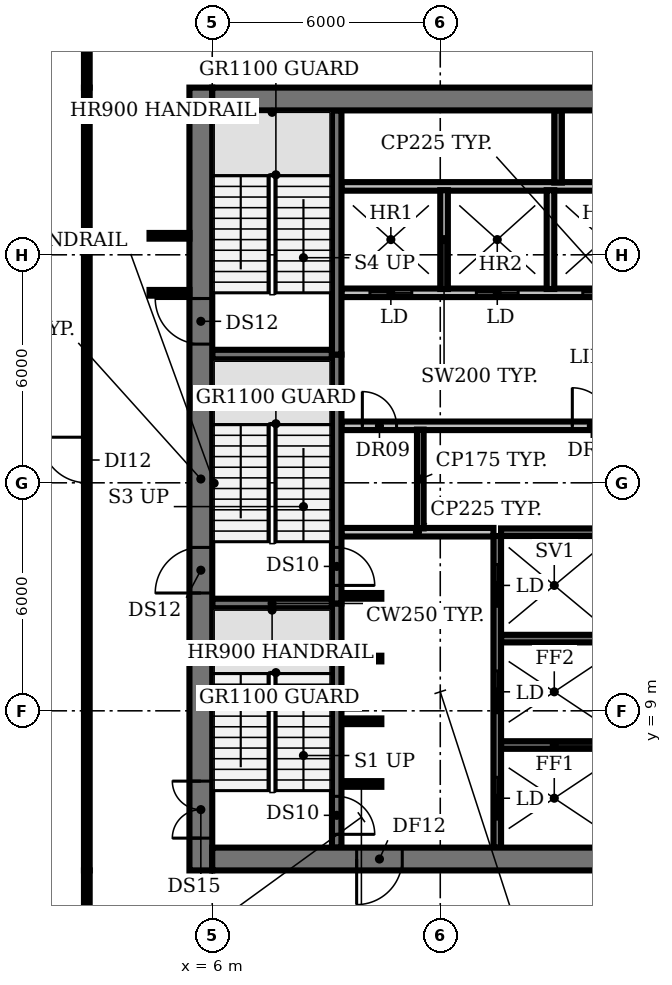
"""IFC4 building model, lengths in metres.
Left out: names, types, materials, properties, quantities, classifications, styles, units other than length and angle.
Written with IfcOpenShell. Run it as: python <this file> out.ifc"""

import sys

from ifc_helpers import new_model, si_unit, direction, frame, frame_2d, origin, place, context, subcontext, project, spatial, rectangle, extrude, element, fill, save


model = new_model("IFC4")
c1 = context("Model", 3, precision=1e-05, world=origin(), true_north=direction((0.0, 1.0)))
c2 = subcontext(c1, "Body", "Model", "MODEL_VIEW")
j1 = project(units=[si_unit("LENGTHUNIT", "METRE"), si_unit("PLANEANGLEUNIT", "RADIAN")], contexts=[c1])
p1 = place(None, origin())
s1 = spatial("IfcSite", under=j1, at=p1, CompositionType="ELEMENT")
p2 = place(p1, origin())
s2 = spatial("IfcBuilding", under=s1, at=p2, CompositionType="ELEMENT")
p3 = place(p2, frame((0.0, 0.0, 176.0)))
s3 = spatial("IfcBuildingStorey", under=s2, at=p3, CompositionType="ELEMENT", Elevation=176.0)
p4 = place(p3, frame((9.4, 7.075, 0.0), z_axis=(0.0, 0.0, 1.0), x_axis=(1.0, 0.0, 0.0)))
e1 = element("IfcWall", 1, at=p4, inside=s3, PredefinedType="SHEAR", context=c2, shape_type="SweptSolid", body=[
    extrude(rectangle(XDim=1.05, YDim=0.15, at=frame_2d((0.525, 0.0))), origin(), (0.0, 0.0, 1.0), 3.85),
])
p5 = place(p3, frame((13.6, 8.1, 0.0), z_axis=(0.0, 0.0, 1.0), x_axis=(1.0, 0.0, 0.0)))
e2 = element("IfcWall", 2, at=p5, inside=s3, PredefinedType="SHEAR", context=c2, shape_type="SweptSolid", body=[
    extrude(rectangle(XDim=2.8, YDim=0.2, at=frame_2d((1.4, 0.0))), origin(), (0.0, 0.0, 1.0), 3.85),
])
for number, where, z_axis, x_axis in (
    (3, (9.4, 8.725, 0.0), (0.0, 0.0, 1.0), (1.0, 0.0, 0.0)),
    (4, (9.4, 10.375, 0.0), (0.0, 0.0, 1.0), (1.0, 0.0, 0.0)),
):
    element("IfcWall", number, at=place(p3, frame(where, z_axis=z_axis, x_axis=x_axis)), inside=s3, PredefinedType="SHEAR", context=c2, shape_type="SweptSolid", body=[
        extrude(rectangle(XDim=1.05, YDim=0.15, at=frame_2d((0.525, 0.0))), origin(), (0.0, 0.0, 1.0), 3.85),
    ])
p6 = place(p3, frame((13.6, 10.9, 0.0), z_axis=(0.0, 0.0, 1.0), x_axis=(1.0, 0.0, 0.0)))
e5 = element("IfcWall", 5, at=p6, inside=s3, PredefinedType="SHEAR", context=c2, shape_type="SweptSolid", body=[
    extrude(rectangle(XDim=2.8, YDim=0.2, at=frame_2d((1.4, 0.0))), origin(), (0.0, 0.0, 1.0), 3.85),
])
p7 = place(p3, frame((6.0, 11.825, 0.0), z_axis=(0.0, 0.0, 1.0), x_axis=(1.0, 0.0, 0.0)))
e6 = element("IfcWall", 6, at=p7, inside=s3, PredefinedType="SHEAR", context=c2, shape_type="SweptSolid", body=[
    extrude(rectangle(XDim=3.15, YDim=0.25, at=frame_2d((1.575, 0.0))), origin(), (0.0, 0.0, 1.0), 3.85),
])
p8 = place(p3, frame((9.4, 12.025, 0.0), z_axis=(0.0, 0.0, 1.0), x_axis=(1.0, 0.0, 0.0)))
e7 = element("IfcWall", 7, at=p8, inside=s3, PredefinedType="SHEAR", context=c2, shape_type="SweptSolid", body=[
    extrude(rectangle(XDim=1.05, YDim=0.15, at=frame_2d((0.525, 0.0))), origin(), (0.0, 0.0, 1.0), 3.85),
])
p9 = place(p3, frame((9.4, 13.7, 0.0), z_axis=(0.0, 0.0, 1.0), x_axis=(1.0, 0.0, 0.0)))
e8 = element("IfcWall", 8, at=p9, inside=s3, PredefinedType="PARTITIONING", context=c2, shape_type="SweptSolid", body=[
    extrude(rectangle(XDim=4.0, YDim=0.225, at=frame_2d((2.0, 0.0))), origin(), (0.0, 0.0, 1.0), 3.85),
])
p10 = place(p3, frame((13.6, 13.7, 0.0), z_axis=(0.0, 0.0, 1.0), x_axis=(1.0, 0.0, 0.0)))
e9 = element("IfcWall", 9, at=p10, inside=s3, PredefinedType="SHEAR", context=c2, shape_type="SweptSolid", body=[
    extrude(rectangle(XDim=2.8, YDim=0.2, at=frame_2d((1.4, 0.0))), origin(), (0.0, 0.0, 1.0), 3.85),
])
p11 = place(p3, frame((9.4, 16.5, 0.0), z_axis=(0.0, 0.0, 1.0), x_axis=(1.0, 0.0, 0.0)))
e10 = element("IfcWall", 10, at=p11, inside=s3, PredefinedType="PARTITIONING", context=c2, shape_type="SweptSolid", body=[
    extrude(rectangle(XDim=14.6, YDim=0.225, at=frame_2d((7.3, 0.0))), origin(), (0.0, 0.0, 1.0), 3.85),
])
p12 = place(p11, frame((0.55, 0.0, 0.0)))
e11 = element("IfcOpeningElement", 11, at=p12, cuts=e10, PredefinedType="OPENING", context=c2, shape_type="SweptSolid", body=[
    extrude(rectangle(XDim=0.9, YDim=2.1, at=frame_2d((0.45, 1.05))), frame((0.0, 0.123, 0.0), z_axis=(0.0, -1.0, 0.0), x_axis=(1.0, 0.0, 0.0)), (0.0, 0.0, 1.0), 0.245),
])
p13 = place(p11, frame((6.075, 0.0, 0.0)))
e12 = element("IfcOpeningElement", 12, at=p13, cuts=e10, PredefinedType="OPENING", context=c2, shape_type="SweptSolid", body=[
    extrude(rectangle(XDim=1.0, YDim=2.1, at=frame_2d((0.5, 1.05))), frame((0.0, 0.123, 0.0), z_axis=(0.0, -1.0, 0.0), x_axis=(1.0, 0.0, 0.0)), (0.0, 0.0, 1.0), 0.245),
])
p14 = place(p11, frame((11.308, 0.0, 0.0)))
e13 = element("IfcOpeningElement", 13, at=p14, cuts=e10, PredefinedType="OPENING", context=c2, shape_type="SweptSolid", body=[
    extrude(rectangle(XDim=0.9, YDim=2.1, at=frame_2d((0.45, 1.05))), frame((0.0, 0.123, 0.0), z_axis=(0.0, -1.0, 0.0), x_axis=(1.0, 0.0, 0.0)), (0.0, 0.0, 1.0), 0.245),
])
p15 = place(p11, frame((13.083, 0.0, 0.0)))
e14 = element("IfcOpeningElement", 14, at=p15, cuts=e10, PredefinedType="OPENING", context=c2, shape_type="SweptSolid", body=[
    extrude(rectangle(XDim=0.9, YDim=2.1, at=frame_2d((0.45, 1.05))), frame((0.0, 0.123, 0.0), z_axis=(0.0, -1.0, 0.0), x_axis=(1.0, 0.0, 0.0)), (0.0, 0.0, 1.0), 0.245),
])
p16 = place(p3, frame((6.0, 18.375, 0.0), z_axis=(0.0, 0.0, 1.0), x_axis=(1.0, 0.0, 0.0)))
e15 = element("IfcWall", 15, at=p16, inside=s3, PredefinedType="SHEAR", context=c2, shape_type="SweptSolid", body=[
    extrude(rectangle(XDim=3.15, YDim=0.25, at=frame_2d((1.575, 0.0))), origin(), (0.0, 0.0, 1.0), 3.85),
])
p17 = place(p3, frame((24.0, 20.0, 0.0), z_axis=(0.0, 0.0, 1.0), x_axis=(-1.0, 0.0, 0.0)))
e16 = element("IfcWall", 16, at=p17, inside=s3, PredefinedType="PARTITIONING", context=c2, shape_type="SweptSolid", body=[
    extrude(rectangle(XDim=14.6, YDim=0.225, at=frame_2d((7.3, 0.0))), origin(), (0.0, 0.0, 1.0), 3.85),
])
p18 = place(p17, frame((12.75, 0.0, 0.0)))
e17 = element("IfcOpeningElement", 17, at=p18, cuts=e16, PredefinedType="OPENING", context=c2, shape_type="SweptSolid", body=[
    extrude(rectangle(XDim=1.1, YDim=2.1, at=frame_2d((0.55, 1.05))), frame((0.0, 0.123, 0.0), z_axis=(0.0, -1.0, 0.0), x_axis=(1.0, 0.0, 0.0)), (0.0, 0.0, 1.0), 0.245),
])
p19 = place(p17, frame((9.95, 0.0, 0.0)))
e18 = element("IfcOpeningElement", 18, at=p19, cuts=e16, PredefinedType="OPENING", context=c2, shape_type="SweptSolid", body=[
    extrude(rectangle(XDim=1.1, YDim=2.1, at=frame_2d((0.55, 1.05))), frame((0.0, 0.123, 0.0), z_axis=(0.0, -1.0, 0.0), x_axis=(1.0, 0.0, 0.0)), (0.0, 0.0, 1.0), 0.245),
])
p20 = place(p17, frame((7.15, 0.0, 0.0)))
e19 = element("IfcOpeningElement", 19, at=p20, cuts=e16, PredefinedType="OPENING", context=c2, shape_type="SweptSolid", body=[
    extrude(rectangle(XDim=1.1, YDim=2.1, at=frame_2d((0.55, 1.05))), frame((0.0, 0.123, 0.0), z_axis=(0.0, -1.0, 0.0), x_axis=(1.0, 0.0, 0.0)), (0.0, 0.0, 1.0), 0.245),
])
p21 = place(p17, frame((4.35, 0.0, 0.0)))
e20 = element("IfcOpeningElement", 20, at=p21, cuts=e16, PredefinedType="OPENING", context=c2, shape_type="SweptSolid", body=[
    extrude(rectangle(XDim=1.1, YDim=2.1, at=frame_2d((0.55, 1.05))), frame((0.0, 0.123, 0.0), z_axis=(0.0, -1.0, 0.0), x_axis=(1.0, 0.0, 0.0)), (0.0, 0.0, 1.0), 0.245),
])
p22 = place(p17, frame((2.308, 0.0, 0.0)))
e21 = element("IfcOpeningElement", 21, at=p22, cuts=e16, PredefinedType="OPENING", context=c2, shape_type="SweptSolid", body=[
    extrude(rectangle(XDim=0.9, YDim=2.1, at=frame_2d((0.45, 1.05))), frame((0.0, 0.123, 0.0), z_axis=(0.0, -1.0, 0.0), x_axis=(1.0, 0.0, 0.0)), (0.0, 0.0, 1.0), 0.245),
])
p23 = place(p17, frame((0.532, 0.0, 0.0)))
e22 = element("IfcOpeningElement", 22, at=p23, cuts=e16, PredefinedType="OPENING", context=c2, shape_type="SweptSolid", body=[
    extrude(rectangle(XDim=0.9, YDim=2.1, at=frame_2d((0.45, 1.05))), frame((0.0, 0.123, 0.0), z_axis=(0.0, -1.0, 0.0), x_axis=(1.0, 0.0, 0.0)), (0.0, 0.0, 1.0), 0.245),
])
p24 = place(p3, frame((9.4, 22.8, 0.0), z_axis=(0.0, 0.0, 1.0), x_axis=(1.0, 0.0, 0.0)))
e23 = element("IfcWall", 23, at=p24, inside=s3, PredefinedType="PARTITIONING", context=c2, shape_type="SweptSolid", body=[
    extrude(rectangle(XDim=14.6, YDim=0.225, at=frame_2d((7.3, 0.0))), origin(), (0.0, 0.0, 1.0), 3.85),
])
p25 = place(p3, frame((9.275, 11.825, 0.0), z_axis=(0.0, 0.0, 1.0), x_axis=(0.0, -1.0, 0.0)))
e24 = element("IfcWall", 24, at=p25, inside=s3, PredefinedType="SHEAR", context=c2, shape_type="SweptSolid", body=[
    extrude(rectangle(XDim=6.425, YDim=0.25, at=frame_2d((3.212, 0.0))), origin(), (0.0, 0.0, 1.0), 3.85),
])
p26 = place(p25, frame((5.075, 0.0, 0.0)))
e25 = element("IfcOpeningElement", 25, at=p26, cuts=e24, PredefinedType="OPENING", context=c2, shape_type="SweptSolid", body=[
    extrude(rectangle(XDim=1.0, YDim=2.1, at=frame_2d((0.5, 1.05))), frame((0.0, 0.135, 0.0), z_axis=(0.0, -1.0, 0.0), x_axis=(1.0, 0.0, 0.0)), (0.0, 0.0, 1.0), 0.27),
])
p27 = place(p3, frame((9.275, 18.375, 0.0), z_axis=(0.0, 0.0, 1.0), x_axis=(0.0, -1.0, 0.0)))
e26 = element("IfcWall", 26, at=p27, inside=s3, PredefinedType="SHEAR", context=c2, shape_type="SweptSolid", body=[
    extrude(rectangle(XDim=6.55, YDim=0.25, at=frame_2d((3.275, 0.0))), origin(), (0.0, 0.0, 1.0), 3.85),
])
p28 = place(p27, frame((5.075, 0.0, 0.0)))
e27 = element("IfcOpeningElement", 27, at=p28, cuts=e26, PredefinedType="OPENING", context=c2, shape_type="SweptSolid", body=[
    extrude(rectangle(XDim=1.0, YDim=2.1, at=frame_2d((0.5, 1.05))), frame((0.0, 0.135, 0.0), z_axis=(0.0, -1.0, 0.0), x_axis=(1.0, 0.0, 0.0)), (0.0, 0.0, 1.0), 0.27),
])
p29 = place(p3, frame((9.275, 18.375, 0.0), z_axis=(0.0, 0.0, 1.0), x_axis=(0.0, 1.0, 0.0)))
e28 = element("IfcWall", 28, at=p29, inside=s3, PredefinedType="SHEAR", context=c2, shape_type="SweptSolid", body=[
    extrude(rectangle(XDim=6.425, YDim=0.25, at=frame_2d((3.212, 0.0))), origin(), (0.0, 0.0, 1.0), 3.85),
])
p30 = place(p3, frame((11.475, 13.8, 0.0), z_axis=(0.0, 0.0, 1.0), x_axis=(0.0, 1.0, 0.0)))
e29 = element("IfcWall", 29, at=p30, inside=s3, PredefinedType="PARTITIONING", context=c2, shape_type="SweptSolid", body=[
    extrude(rectangle(XDim=2.6, YDim=0.175, at=frame_2d((1.3, 0.0))), origin(), (0.0, 0.0, 1.0), 3.85),
])
p31 = place(p3, frame((12.1, 20.1, 0.0), z_axis=(0.0, 0.0, 1.0), x_axis=(0.0, 1.0, 0.0)))
e30 = element("IfcWall", 30, at=p31, inside=s3, PredefinedType="SOLIDWALL", context=c2, shape_type="SweptSolid", body=[
    extrude(rectangle(XDim=2.6, YDim=0.2, at=frame_2d((1.3, 0.0))), origin(), (0.0, 0.0, 1.0), 3.85),
])
p32 = place(p3, frame((13.5, 5.4, 0.0), z_axis=(0.0, 0.0, 1.0), x_axis=(0.0, 1.0, 0.0)))
e31 = element("IfcWall", 31, at=p32, inside=s3, PredefinedType="SHEAR", context=c2, shape_type="SweptSolid", body=[
    extrude(rectangle(XDim=8.2, YDim=0.2, at=frame_2d((4.1, 0.0))), origin(), (0.0, 0.0, 1.0), 3.85),
])
p33 = place(p32, frame((0.75, 0.0, 0.0)))
e32 = element("IfcOpeningElement", 32, at=p33, cuts=e31, PredefinedType="OPENING", context=c2, shape_type="SweptSolid", body=[
    extrude(rectangle(XDim=1.1, YDim=2.1, at=frame_2d((0.55, 1.05))), frame((0.0, 0.11, 0.0), z_axis=(0.0, -1.0, 0.0), x_axis=(1.0, 0.0, 0.0)), (0.0, 0.0, 1.0), 0.22),
])
p34 = place(p32, frame((3.55, 0.0, 0.0)))
e33 = element("IfcOpeningElement", 33, at=p34, cuts=e31, PredefinedType="OPENING", context=c2, shape_type="SweptSolid", body=[
    extrude(rectangle(XDim=1.1, YDim=2.1, at=frame_2d((0.55, 1.05))), frame((0.0, 0.11, 0.0), z_axis=(0.0, -1.0, 0.0), x_axis=(1.0, 0.0, 0.0)), (0.0, 0.0, 1.0), 0.22),
])
p35 = place(p32, frame((6.35, 0.0, 0.0)))
e34 = element("IfcOpeningElement", 34, at=p35, cuts=e31, PredefinedType="OPENING", context=c2, shape_type="SweptSolid", body=[
    extrude(rectangle(XDim=1.1, YDim=2.1, at=frame_2d((0.55, 1.05))), frame((0.0, 0.11, 0.0), z_axis=(0.0, -1.0, 0.0), x_axis=(1.0, 0.0, 0.0)), (0.0, 0.0, 1.0), 0.22),
])
p36 = place(p3, frame((14.9, 20.1, 0.0), z_axis=(0.0, 0.0, 1.0), x_axis=(0.0, 1.0, 0.0)))
e35 = element("IfcWall", 35, at=p36, inside=s3, PredefinedType="SOLIDWALL", context=c2, shape_type="SweptSolid", body=[
    extrude(rectangle(XDim=2.6, YDim=0.2, at=frame_2d((1.3, 0.0))), origin(), (0.0, 0.0, 1.0), 3.85),
])
p37 = place(p3, frame((15.1, 22.9, 0.0), z_axis=(0.0, 0.0, 1.0), x_axis=(0.0, 1.0, 0.0)))
e36 = element("IfcWall", 36, at=p37, inside=s3, PredefinedType="SHEAR", context=c2, shape_type="SweptSolid", body=[
    extrude(rectangle(XDim=1.9, YDim=0.2, at=frame_2d((0.95, 0.0))), origin(), (0.0, 0.0, 1.0), 3.85),
])
p38 = place(p3, frame((5.7, 4.8, 0.0), z_axis=(0.0, 0.0, 1.0), x_axis=(0.0, 1.0, 0.0)))
e37 = element("IfcWall", 37, at=p38, inside=s3, PredefinedType="SHEAR", context=c2, shape_type="SweptSolid", body=[
    extrude(rectangle(XDim=20.6, YDim=0.6, at=frame_2d((10.3, 0.0))), origin(), (0.0, 0.0, 1.0), 3.85),
])
p39 = place(p38, frame((0.85, 0.0, 0.0)))
e38 = element("IfcOpeningElement", 38, at=p39, cuts=e37, PredefinedType="OPENING", context=c2, shape_type="SweptSolid", body=[
    extrude(rectangle(XDim=1.5, YDim=2.1, at=frame_2d((0.75, 1.05))), frame((0.0, 0.31, 0.0), z_axis=(0.0, -1.0, 0.0), x_axis=(1.0, 0.0, 0.0)), (0.0, 0.0, 1.0), 0.62),
])
p40 = place(p38, frame((7.3, 0.0, 0.0)))
e39 = element("IfcOpeningElement", 39, at=p40, cuts=e37, PredefinedType="OPENING", context=c2, shape_type="SweptSolid", body=[
    extrude(rectangle(XDim=1.2, YDim=2.1, at=frame_2d((0.6, 1.05))), frame((0.0, 0.31, 0.0), z_axis=(0.0, -1.0, 0.0), x_axis=(1.0, 0.0, 0.0)), (0.0, 0.0, 1.0), 0.62),
])
p41 = place(p38, frame((13.85, 0.0, 0.0)))
e40 = element("IfcOpeningElement", 40, at=p41, cuts=e37, PredefinedType="OPENING", context=c2, shape_type="SweptSolid", body=[
    extrude(rectangle(XDim=1.2, YDim=2.1, at=frame_2d((0.6, 1.05))), frame((0.0, 0.31, 0.0), z_axis=(0.0, -1.0, 0.0), x_axis=(1.0, 0.0, 0.0)), (0.0, 0.0, 1.0), 0.62),
])
p42 = place(p3, frame((24.0, 5.1, 0.0), z_axis=(0.0, 0.0, 1.0), x_axis=(-1.0, 0.0, 0.0)))
e41 = element("IfcWall", 41, at=p42, inside=s3, PredefinedType="SHEAR", context=c2, shape_type="SweptSolid", body=[
    extrude(rectangle(XDim=18.0, YDim=0.6, at=frame_2d((9.0, 0.0))), origin(), (0.0, 0.0, 1.0), 3.85),
])
p43 = place(p42, frame((13.0, 0.0, 0.0)))
e42 = element("IfcOpeningElement", 42, at=p43, cuts=e41, PredefinedType="OPENING", context=c2, shape_type="SweptSolid", body=[
    extrude(rectangle(XDim=1.2, YDim=2.1, at=frame_2d((0.6, 1.05))), frame((0.0, 0.31, 0.0), z_axis=(0.0, -1.0, 0.0), x_axis=(1.0, 0.0, 0.0)), (0.0, 0.0, 1.0), 0.62),
])
p44 = place(p42, frame((4.9, 0.0, 0.0)))
e43 = element("IfcOpeningElement", 43, at=p44, cuts=e41, PredefinedType="OPENING", context=c2, shape_type="SweptSolid", body=[
    extrude(rectangle(XDim=1.0, YDim=2.1, at=frame_2d((0.5, 1.05))), frame((0.0, 0.31, 0.0), z_axis=(0.0, -1.0, 0.0), x_axis=(1.0, 0.0, 0.0)), (0.0, 0.0, 1.0), 0.62),
])
p45 = place(p3, frame((6.0, 25.1, 0.0), z_axis=(0.0, 0.0, 1.0), x_axis=(1.0, 0.0, 0.0)))
e44 = element("IfcWall", 44, at=p45, inside=s3, PredefinedType="SHEAR", context=c2, shape_type="SweptSolid", body=[
    extrude(rectangle(XDim=18.0, YDim=0.6, at=frame_2d((9.0, 0.0))), origin(), (0.0, 0.0, 1.0), 3.85),
])
p46 = place(p3, frame((2.7, 0.9, 0.0), z_axis=(0.0, 0.0, 1.0), x_axis=(0.0, 1.0, 0.0)))
e45 = element("IfcWall", 45, at=p46, inside=s3, PredefinedType="PARTITIONING", context=c2, shape_type="SweptSolid", body=[
    extrude(rectangle(XDim=3.9, YDim=0.15, at=frame_2d((1.95, 0.0))), origin(), (0.0, 0.0, 1.0), 2.88),
])
p47 = place(p3, frame((2.7, 4.8, 0.0), z_axis=(0.0, 0.0, 1.0), x_axis=(0.0, 1.0, 0.0)))
e46 = element("IfcWall", 46, at=p47, inside=s3, PredefinedType="PARTITIONING", context=c2, shape_type="SweptSolid", body=[
    extrude(rectangle(XDim=20.6, YDim=0.15, at=frame_2d((10.3, 0.0))), origin(), (0.0, 0.0, 1.0), 2.88),
])
p48 = place(p47, frame((10.2, 0.0, 0.0)))
e47 = element("IfcOpeningElement", 47, at=p48, cuts=e46, PredefinedType="OPENING", context=c2, shape_type="SweptSolid", body=[
    extrude(rectangle(XDim=1.2, YDim=2.1, at=frame_2d((0.6, 1.05))), frame((0.0, 0.085, 0.0), z_axis=(0.0, -1.0, 0.0), x_axis=(1.0, 0.0, 0.0)), (0.0, 0.0, 1.0), 0.17),
])
p49 = place(p3, frame((2.7, 25.4, 0.0), z_axis=(0.0, 0.0, 1.0), x_axis=(0.0, 1.0, 0.0)))
e48 = element("IfcWall", 48, at=p49, inside=s3, PredefinedType="PARTITIONING", context=c2, shape_type="SweptSolid", body=[
    extrude(rectangle(XDim=3.9, YDim=0.15, at=frame_2d((1.95, 0.0))), origin(), (0.0, 0.0, 1.0), 2.88),
])
for number, where, z_axis, x_axis in (
    (49, (4.35, 20.0, 0.0), (0.0, 0.0, 1.0), (1.0, 0.0, 0.0)),
    (50, (4.35, 21.5, 0.0), (0.0, 0.0, 1.0), (1.0, 0.0, 0.0)),
):
    element("IfcWall", number, at=place(p3, frame(where, z_axis=z_axis, x_axis=x_axis)), inside=s3, PredefinedType="PARTITIONING", context=c2, shape_type="SweptSolid", body=[
        extrude(rectangle(XDim=1.05, YDim=0.15, at=frame_2d((0.525, 0.0))), origin(), (0.0, 0.0, 1.0), 2.88),
    ])
p50 = place(p12, origin())
e51 = element("IfcDoor", 51, at=p50, inside=s3, OperationType="SINGLE_SWING_LEFT", PredefinedType="DOOR", context=c2, shape_type="SweptSolid", body=[
    extrude(rectangle(XDim=0.9, YDim=2.1, at=frame_2d((0.45, 1.05))), frame((0.0, 0.025, 0.0), z_axis=(0.0, -1.0, 0.0), x_axis=(1.0, 0.0, 0.0)), (0.0, 0.0, 1.0), 0.05),
])
fill(e11, e51)
p51 = place(p13, origin())
e52 = element("IfcDoor", 52, at=p51, inside=s3, OperationType="SINGLE_SWING_LEFT", PredefinedType="DOOR", context=c2, shape_type="SweptSolid", body=[
    extrude(rectangle(XDim=1.0, YDim=2.1, at=frame_2d((0.5, 1.05))), frame((0.0, 0.025, 0.0), z_axis=(0.0, -1.0, 0.0), x_axis=(1.0, 0.0, 0.0)), (0.0, 0.0, 1.0), 0.05),
])
fill(e12, e52)
p52 = place(p18, origin())
e53 = element("IfcDoor", 53, at=p52, inside=s3, OperationType="DOUBLE_DOOR_SLIDING", PredefinedType="DOOR", context=c2, shape_type="SweptSolid", body=[
    extrude(rectangle(XDim=1.1, YDim=2.1, at=frame_2d((0.55, 1.05))), frame((0.0, 0.025, 0.0), z_axis=(0.0, -1.0, 0.0), x_axis=(1.0, 0.0, 0.0)), (0.0, 0.0, 1.0), 0.05),
])
fill(e17, e53)
p53 = place(p19, origin())
e54 = element("IfcDoor", 54, at=p53, inside=s3, OperationType="DOUBLE_DOOR_SLIDING", PredefinedType="DOOR", context=c2, shape_type="SweptSolid", body=[
    extrude(rectangle(XDim=1.1, YDim=2.1, at=frame_2d((0.55, 1.05))), frame((0.0, 0.025, 0.0), z_axis=(0.0, -1.0, 0.0), x_axis=(1.0, 0.0, 0.0)), (0.0, 0.0, 1.0), 0.05),
])
fill(e18, e54)
p54 = place(p20, origin())
e55 = element("IfcDoor", 55, at=p54, inside=s3, OperationType="DOUBLE_DOOR_SLIDING", PredefinedType="DOOR", context=c2, shape_type="SweptSolid", body=[
    extrude(rectangle(XDim=1.1, YDim=2.1, at=frame_2d((0.55, 1.05))), frame((0.0, 0.025, 0.0), z_axis=(0.0, -1.0, 0.0), x_axis=(1.0, 0.0, 0.0)), (0.0, 0.0, 1.0), 0.05),
])
fill(e19, e55)
p55 = place(p26, origin())
e56 = element("IfcDoor", 56, at=p55, inside=s3, OperationType="SINGLE_SWING_RIGHT", PredefinedType="DOOR", context=c2, shape_type="SweptSolid", body=[
    extrude(rectangle(XDim=1.0, YDim=2.1, at=frame_2d((0.5, 1.05))), frame((0.0, 0.025, 0.0), z_axis=(0.0, -1.0, 0.0), x_axis=(1.0, 0.0, 0.0)), (0.0, 0.0, 1.0), 0.05),
])
fill(e25, e56)
p56 = place(p28, origin())
e57 = element("IfcDoor", 57, at=p56, inside=s3, OperationType="SINGLE_SWING_RIGHT", PredefinedType="DOOR", context=c2, shape_type="SweptSolid", body=[
    extrude(rectangle(XDim=1.0, YDim=2.1, at=frame_2d((0.5, 1.05))), frame((0.0, 0.025, 0.0), z_axis=(0.0, -1.0, 0.0), x_axis=(1.0, 0.0, 0.0)), (0.0, 0.0, 1.0), 0.05),
])
fill(e27, e57)
p57 = place(p33, origin())
e58 = element("IfcDoor", 58, at=p57, inside=s3, OperationType="DOUBLE_DOOR_SLIDING", PredefinedType="DOOR", context=c2, shape_type="SweptSolid", body=[
    extrude(rectangle(XDim=1.1, YDim=2.1, at=frame_2d((0.55, 1.05))), frame((0.0, 0.025, 0.0), z_axis=(0.0, -1.0, 0.0), x_axis=(1.0, 0.0, 0.0)), (0.0, 0.0, 1.0), 0.05),
])
fill(e32, e58)
p58 = place(p34, origin())
e59 = element("IfcDoor", 59, at=p58, inside=s3, OperationType="DOUBLE_DOOR_SLIDING", PredefinedType="DOOR", context=c2, shape_type="SweptSolid", body=[
    extrude(rectangle(XDim=1.1, YDim=2.1, at=frame_2d((0.55, 1.05))), frame((0.0, 0.025, 0.0), z_axis=(0.0, -1.0, 0.0), x_axis=(1.0, 0.0, 0.0)), (0.0, 0.0, 1.0), 0.05),
])
fill(e33, e59)
p59 = place(p35, origin())
e60 = element("IfcDoor", 60, at=p59, inside=s3, OperationType="DOUBLE_DOOR_SLIDING", PredefinedType="DOOR", context=c2, shape_type="SweptSolid", body=[
    extrude(rectangle(XDim=1.1, YDim=2.1, at=frame_2d((0.55, 1.05))), frame((0.0, 0.025, 0.0), z_axis=(0.0, -1.0, 0.0), x_axis=(1.0, 0.0, 0.0)), (0.0, 0.0, 1.0), 0.05),
])
fill(e34, e60)
p60 = place(p39, origin())
e61 = element("IfcDoor", 61, at=p60, inside=s3, OperationType="DOUBLE_DOOR_SINGLE_SWING", PredefinedType="DOOR", context=c2, shape_type="SweptSolid", body=[
    extrude(rectangle(XDim=1.5, YDim=2.1, at=frame_2d((0.75, 1.05))), frame((0.0, 0.025, 0.0), z_axis=(0.0, -1.0, 0.0), x_axis=(1.0, 0.0, 0.0)), (0.0, 0.0, 1.0), 0.05),
])
fill(e38, e61)
p61 = place(p40, origin())
e62 = element("IfcDoor", 62, at=p61, inside=s3, OperationType="SINGLE_SWING_LEFT", PredefinedType="DOOR", context=c2, shape_type="SweptSolid", body=[
    extrude(rectangle(XDim=1.2, YDim=2.1, at=frame_2d((0.6, 1.05))), frame((0.0, 0.025, 0.0), z_axis=(0.0, -1.0, 0.0), x_axis=(1.0, 0.0, 0.0)), (0.0, 0.0, 1.0), 0.05),
])
fill(e39, e62)
p62 = place(p41, origin())
e63 = element("IfcDoor", 63, at=p62, inside=s3, OperationType="SINGLE_SWING_RIGHT", PredefinedType="DOOR", context=c2, shape_type="SweptSolid", body=[
    extrude(rectangle(XDim=1.2, YDim=2.1, at=frame_2d((0.6, 1.05))), frame((0.0, 0.025, 0.0), z_axis=(0.0, -1.0, 0.0), x_axis=(1.0, 0.0, 0.0)), (0.0, 0.0, 1.0), 0.05),
])
fill(e40, e63)
p63 = place(p43, origin())
e64 = element("IfcDoor", 64, at=p63, inside=s3, OperationType="SINGLE_SWING_RIGHT", PredefinedType="DOOR", context=c2, shape_type="SweptSolid", body=[
    extrude(rectangle(XDim=1.2, YDim=2.1, at=frame_2d((0.6, 1.05))), frame((0.0, 0.025, 0.0), z_axis=(0.0, -1.0, 0.0), x_axis=(1.0, 0.0, 0.0)), (0.0, 0.0, 1.0), 0.05),
])
fill(e42, e64)
p64 = place(p48, origin())
e65 = element("IfcDoor", 65, at=p64, inside=s3, OperationType="SINGLE_SWING_RIGHT", PredefinedType="DOOR", context=c2, shape_type="SweptSolid", body=[
    extrude(rectangle(XDim=1.2, YDim=2.1, at=frame_2d((0.6, 1.05))), frame((0.0, 0.025, 0.0), z_axis=(0.0, -1.0, 0.0), x_axis=(1.0, 0.0, 0.0)), (0.0, 0.0, 1.0), 0.05),
])
fill(e47, e65)
save(model, sys.argv[1])
